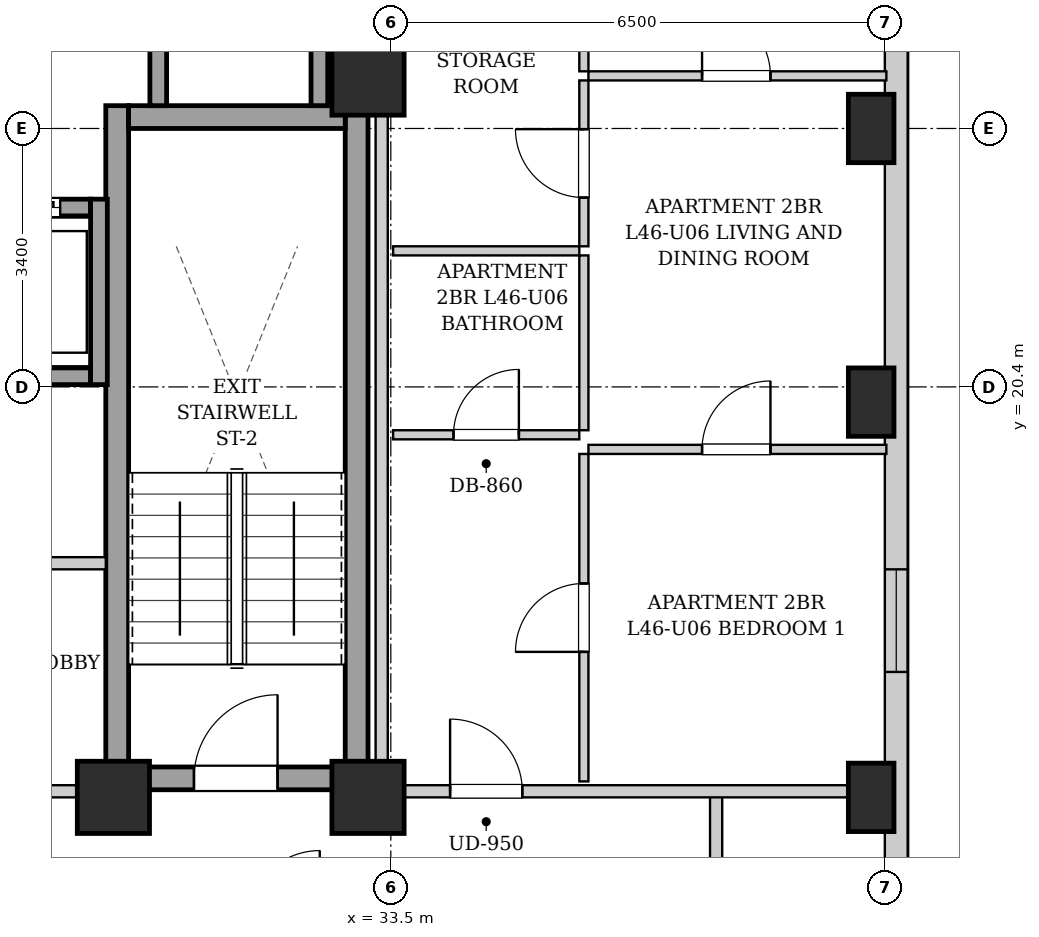
"""IFC4 building model, lengths in metres.
Left out: names, types, materials, properties, quantities, classifications, styles, units other than length and angle.
Written with IfcOpenShell. Run it as: python <this file> out.ifc"""

import sys

from ifc_helpers import new_model, si_unit, direction, frame, frame_2d, origin, origin_2d, place, context, subcontext, project, spatial, rectangle, extrude, element, fill, save


model = new_model("IFC4")
c1 = context("Model", 3, precision=1e-05, world=origin(), true_north=direction((0.0, 1.0)))
c2 = subcontext(c1, "Body", "Model", "MODEL_VIEW")
j1 = project(units=[si_unit("LENGTHUNIT", "METRE"), si_unit("PLANEANGLEUNIT", "RADIAN")], contexts=[c1])
p1 = place(None, origin())
s1 = spatial("IfcSite", under=j1, at=p1, CompositionType="ELEMENT")
p2 = place(p1, origin())
s2 = spatial("IfcBuilding", under=s1, at=p2, CompositionType="ELEMENT")
p3 = place(p2, frame((0.0, 0.0, 160.15)))
s3 = spatial("IfcBuildingStorey", under=s2, at=p3, CompositionType="ELEMENT", Elevation=160.15)
for number, where, z_axis, x_axis in (
    (1, (39.82, 15.0, 0.0), (0.0, 0.0, 1.0), (1.0, 0.0, 0.0)),
    (2, (39.82, 20.2, 0.0), (0.0, 0.0, 1.0), (1.0, 0.0, 0.0)),
    (3, (39.82, 23.8, 0.0), (0.0, 0.0, 1.0), (1.0, 0.0, 0.0)),
):
    element("IfcColumn", number, at=place(p3, frame(where, z_axis=z_axis, x_axis=x_axis)), inside=s3, PredefinedType="COLUMN", context=c2, shape_type="SweptSolid", body=[
        extrude(rectangle(XDim=0.6, YDim=0.9, at=origin_2d()), origin(), (0.0, 0.0, 1.0), 3.25),
    ])
for number, where, z_axis, x_axis in (
    (4, (29.85, 15.0, 0.0), (0.0, 0.0, 1.0), (1.0, 0.0, 0.0)),
    (5, (33.2, 15.0, 0.0), (0.0, 0.0, 1.0), (1.0, 0.0, 0.0)),
    (6, (33.2, 24.45, 0.0), (0.0, 0.0, 1.0), (1.0, 0.0, 0.0)),
):
    element("IfcColumn", number, at=place(p3, frame(where, z_axis=z_axis, x_axis=x_axis)), inside=s3, PredefinedType="COLUMN", context=c2, shape_type="SweptSolid", body=[
        extrude(rectangle(XDim=0.95, YDim=0.95, at=origin_2d()), origin(), (0.0, 0.0, 1.0), 3.25),
    ])
p4 = place(p3, frame((40.15, 40.8, 0.0), z_axis=(0.0, 0.0, 1.0), x_axis=(0.0, -1.0, 0.0)))
e7 = element("IfcWall", 7, at=p4, inside=s3, PredefinedType="SOLIDWALL", context=c2, shape_type="SweptSolid", body=[
    extrude(rectangle(XDim=34.5, YDim=0.3, at=frame_2d((17.25, 0.0))), origin(), (0.0, 0.0, 1.0), 2.99),
])
p5 = place(p4, frame((31.575, 0.0, 0.55)))
e8 = element("IfcOpeningElement", 8, at=p5, cuts=e7, PredefinedType="OPENING", context=c2, shape_type="SweptSolid", body=[
    extrude(rectangle(XDim=1.35, YDim=1.2, at=frame_2d((0.675, 0.6))), frame((0.0, 0.16, 0.0), z_axis=(0.0, -1.0, 0.0), x_axis=(1.0, 0.0, 0.0)), (0.0, 0.0, 1.0), 0.32),
])
p6 = place(p4, frame((3.075, 0.0, 0.55)))
e9 = element("IfcOpeningElement", 9, at=p6, cuts=e7, PredefinedType="OPENING", context=c2, shape_type="SweptSolid", body=[
    extrude(rectangle(XDim=1.35, YDim=1.2, at=frame_2d((0.675, 0.6))), frame((0.0, 0.16, 0.0), z_axis=(0.0, -1.0, 0.0), x_axis=(1.0, 0.0, 0.0)), (0.0, 0.0, 1.0), 0.32),
])
p7 = place(p4, frame((1.085, 0.0, 0.55)))
e10 = element("IfcOpeningElement", 10, at=p7, cuts=e7, PredefinedType="OPENING", context=c2, shape_type="SweptSolid", body=[
    extrude(rectangle(XDim=1.35, YDim=1.2, at=frame_2d((0.675, 0.6))), frame((0.0, 0.16, 0.0), z_axis=(0.0, -1.0, 0.0), x_axis=(1.0, 0.0, 0.0)), (0.0, 0.0, 1.0), 0.32),
])
p8 = place(p4, frame((22.8, 0.0, 0.55)))
e11 = element("IfcOpeningElement", 11, at=p8, cuts=e7, PredefinedType="OPENING", context=c2, shape_type="SweptSolid", body=[
    extrude(rectangle(XDim=1.35, YDim=1.2, at=frame_2d((0.675, 0.6))), frame((0.0, 0.16, 0.0), z_axis=(0.0, -1.0, 0.0), x_axis=(1.0, 0.0, 0.0)), (0.0, 0.0, 1.0), 0.32),
])
p9 = place(p4, frame((13.425, 0.0, 0.55)))
e12 = element("IfcOpeningElement", 12, at=p9, cuts=e7, PredefinedType="OPENING", context=c2, shape_type="SweptSolid", body=[
    extrude(rectangle(XDim=1.35, YDim=1.2, at=frame_2d((0.675, 0.6))), frame((0.0, 0.16, 0.0), z_axis=(0.0, -1.0, 0.0), x_axis=(1.0, 0.0, 0.0)), (0.0, 0.0, 1.0), 0.32),
])
for number, where, z_axis, x_axis in (
    (13, (29.9, 15.1, 0.0), (0.0, 0.0, 1.0), (0.0, 1.0, 0.0)),
    (14, (33.05, 15.1, 0.0), (0.0, 0.0, 1.0), (0.0, 1.0, 0.0)),
):
    element("IfcWall", number, at=place(p3, frame(where, z_axis=z_axis, x_axis=x_axis)), inside=s3, PredefinedType="SHEAR", context=c2, shape_type="SweptSolid", body=[
        extrude(rectangle(XDim=9.0, YDim=0.3, at=frame_2d((4.5, 0.0))), origin(), (0.0, 0.0, 1.0), 2.99),
    ])
p10 = place(p3, frame((30.05, 23.95, 0.0), z_axis=(0.0, 0.0, 1.0), x_axis=(1.0, 0.0, 0.0)))
e15 = element("IfcWall", 15, at=p10, inside=s3, PredefinedType="SHEAR", context=c2, shape_type="SweptSolid", body=[
    extrude(rectangle(XDim=2.85, YDim=0.3, at=frame_2d((1.425, 0.0))), origin(), (0.0, 0.0, 1.0), 2.99),
])
p11 = place(p3, frame((30.05, 15.25, 0.0), z_axis=(0.0, 0.0, 1.0), x_axis=(1.0, 0.0, 0.0)))
e16 = element("IfcWall", 16, at=p11, inside=s3, PredefinedType="SHEAR", context=c2, shape_type="SweptSolid", body=[
    extrude(rectangle(XDim=2.85, YDim=0.3, at=frame_2d((1.425, 0.0))), origin(), (0.0, 0.0, 1.0), 2.99),
])
p12 = place(p11, frame((0.86, 0.0, 0.0)))
e17 = element("IfcOpeningElement", 17, at=p12, cuts=e16, PredefinedType="OPENING", context=c2, shape_type="SweptSolid", body=[
    extrude(rectangle(XDim=1.1, YDim=2.05, at=frame_2d((0.55, 1.025))), frame((0.0, 0.16, 0.0), z_axis=(0.0, -1.0, 0.0), x_axis=(1.0, 0.0, 0.0)), (0.0, 0.0, 1.0), 0.32),
])
p13 = place(p3, frame((27.65, 20.54, 0.0), z_axis=(0.0, 0.0, 1.0), x_axis=(1.0, 0.0, 0.0)))
e18 = element("IfcWall", 18, at=p13, inside=s3, PredefinedType="SHEAR", context=c2, shape_type="SweptSolid", body=[
    extrude(rectangle(XDim=1.9, YDim=0.22, at=frame_2d((0.95, 0.0))), origin(), (0.0, 0.0, 1.0), 2.99),
])
p14 = place(p3, frame((27.65, 22.76, 0.0), z_axis=(0.0, 0.0, 1.0), x_axis=(1.0, 0.0, 0.0)))
e19 = element("IfcWall", 19, at=p14, inside=s3, PredefinedType="SHEAR", context=c2, shape_type="SweptSolid", body=[
    extrude(rectangle(XDim=1.9, YDim=0.22, at=frame_2d((0.95, 0.0))), origin(), (0.0, 0.0, 1.0), 2.99),
])
p15 = place(p14, frame((0.4, 0.0, 0.0)))
e20 = element("IfcOpeningElement", 20, at=p15, cuts=e19, PredefinedType="OPENING", context=c2, shape_type="SweptSolid", body=[
    extrude(rectangle(XDim=1.1, YDim=2.15, at=frame_2d((0.55, 1.075))), frame((0.0, 0.12, 0.0), z_axis=(0.0, -1.0, 0.0), x_axis=(1.0, 0.0, 0.0)), (0.0, 0.0, 1.0), 0.24),
])
p16 = place(p3, frame((29.66, 20.43, 0.0), z_axis=(0.0, 0.0, 1.0), x_axis=(0.0, 1.0, 0.0)))
e21 = element("IfcWall", 21, at=p16, inside=s3, PredefinedType="SHEAR", context=c2, shape_type="SweptSolid", body=[
    extrude(rectangle(XDim=2.44, YDim=0.22, at=frame_2d((1.22, 0.0))), origin(), (0.0, 0.0, 1.0), 2.99),
])
for number, where, z_axis, x_axis in (
    (22, (30.44, 24.1, 0.0), (0.0, 0.0, 1.0), (0.0, 1.0, 0.0)),
    (23, (32.56, 24.1, 0.0), (0.0, 0.0, 1.0), (0.0, 1.0, 0.0)),
):
    element("IfcWall", number, at=place(p3, frame(where, z_axis=z_axis, x_axis=x_axis)), inside=s3, PredefinedType="SHEAR", context=c2, shape_type="SweptSolid", body=[
        extrude(rectangle(XDim=2.07, YDim=0.22, at=frame_2d((1.035, 0.0))), origin(), (0.0, 0.0, 1.0), 2.99),
    ])
p17 = place(p3, frame((21.25, 15.08, 0.0), z_axis=(0.0, 0.0, 1.0), x_axis=(1.0, 0.0, 0.0)))
e24 = element("IfcWall", 24, at=p17, inside=s3, PredefinedType="PARTITIONING", context=c2, shape_type="SweptSolid", body=[
    extrude(rectangle(XDim=8.5, YDim=0.16, at=frame_2d((4.25, 0.0))), origin(), (0.0, 0.0, 1.0), 2.442),
])
p18 = place(p17, frame((3.725, 0.0, 0.0)))
e25 = element("IfcOpeningElement", 25, at=p18, cuts=e24, PredefinedType="OPENING", context=c2, shape_type="SweptSolid", body=[
    extrude(rectangle(XDim=1.05, YDim=2.05, at=frame_2d((0.525, 1.025))), frame((0.0, 0.09, 0.0), z_axis=(0.0, -1.0, 0.0), x_axis=(1.0, 0.0, 0.0)), (0.0, 0.0, 1.0), 0.18),
])
p19 = place(p3, frame((28.65, 18.08, 0.0), z_axis=(0.0, 0.0, 1.0), x_axis=(1.0, 0.0, 0.0)))
e26 = element("IfcWall", 26, at=p19, inside=s3, PredefinedType="PARTITIONING", context=c2, shape_type="SweptSolid", body=[
    extrude(rectangle(XDim=1.1, YDim=0.16, at=frame_2d((0.55, 0.0))), origin(), (0.0, 0.0, 1.0), 2.99),
])
p20 = place(p3, frame((33.12, 24.12, 0.0), z_axis=(0.0, 0.0, 1.0), x_axis=(0.0, 1.0, 0.0)))
e27 = element("IfcWall", 27, at=p20, inside=s3, PredefinedType="PARTITIONING", context=c2, shape_type="SweptSolid", body=[
    extrude(rectangle(XDim=4.76, YDim=0.16, at=frame_2d((2.38, 0.0))), origin(), (0.0, 0.0, 1.0), 2.99),
])
p21 = place(p3, frame((37.78, 13.35, 0.0), z_axis=(0.0, 0.0, 1.0), x_axis=(0.0, 1.0, 0.0)))
e28 = element("IfcWall", 28, at=p21, inside=s3, PredefinedType="PARTITIONING", context=c2, shape_type="SweptSolid", body=[
    extrude(rectangle(XDim=1.74, YDim=0.16, at=frame_2d((0.87, 0.0))), origin(), (0.0, 0.0, 1.0), 2.99),
])
p22 = place(p3, frame((33.38, 15.08, 0.0), z_axis=(0.0, 0.0, 1.0), x_axis=(1.0, 0.0, 0.0)))
e29 = element("IfcWall", 29, at=p22, inside=s3, PredefinedType="PARTITIONING", context=c2, shape_type="SweptSolid", body=[
    extrude(rectangle(XDim=6.64, YDim=0.16, at=frame_2d((3.32, 0.0))), origin(), (0.0, 0.0, 1.0), 2.442),
])
p23 = place(p22, frame((0.9, 0.0, 0.0)))
e30 = element("IfcOpeningElement", 30, at=p23, cuts=e29, PredefinedType="OPENING", context=c2, shape_type="SweptSolid", body=[
    extrude(rectangle(XDim=0.95, YDim=2.1, at=frame_2d((0.475, 1.05))), frame((0.0, 0.09, 0.0), z_axis=(0.0, -1.0, 0.0), x_axis=(1.0, 0.0, 0.0)), (0.0, 0.0, 1.0), 0.18),
])
p24 = place(p3, frame((33.53, 22.19, 0.0), z_axis=(0.0, 0.0, 1.0), x_axis=(1.0, 0.0, 0.0)))
e31 = element("IfcWall", 31, at=p24, inside=s3, PredefinedType="PARTITIONING", context=c2, shape_type="SweptSolid", body=[
    extrude(rectangle(XDim=2.45, YDim=0.12, at=frame_2d((1.225, 0.0))), origin(), (0.0, 0.0, 1.0), 2.99),
])
p25 = place(p3, frame((36.04, 22.25, 0.0), z_axis=(0.0, 0.0, 1.0), x_axis=(0.0, 1.0, 0.0)))
e32 = element("IfcWall", 32, at=p25, inside=s3, PredefinedType="PARTITIONING", context=c2, shape_type="SweptSolid", body=[
    extrude(rectangle(XDim=2.182, YDim=0.12, at=frame_2d((1.091, 0.0))), origin(), (0.0, 0.0, 1.0), 2.99),
])
p26 = place(p25, frame((0.641, 0.0, 0.0)))
e33 = element("IfcOpeningElement", 33, at=p26, cuts=e32, PredefinedType="OPENING", context=c2, shape_type="SweptSolid", body=[
    extrude(rectangle(XDim=0.9, YDim=2.05, at=frame_2d((0.45, 1.025))), frame((0.0, 0.07, 0.0), z_axis=(0.0, -1.0, 0.0), x_axis=(1.0, 0.0, 0.0)), (0.0, 0.0, 1.0), 0.14),
])
p27 = place(p3, frame((36.04, 24.552, 0.0), z_axis=(0.0, 0.0, 1.0), x_axis=(0.0, 1.0, 0.0)))
e34 = element("IfcWall", 34, at=p27, inside=s3, PredefinedType="PARTITIONING", context=c2, shape_type="SweptSolid", body=[
    extrude(rectangle(XDim=4.308, YDim=0.12, at=frame_2d((2.154, 0.0))), origin(), (0.0, 0.0, 1.0), 2.99),
])
p28 = place(p27, frame((1.704, 0.0, 0.0)))
e35 = element("IfcOpeningElement", 35, at=p28, cuts=e34, PredefinedType="OPENING", context=c2, shape_type="SweptSolid", body=[
    extrude(rectangle(XDim=0.9, YDim=2.05, at=frame_2d((0.45, 1.025))), frame((0.0, 0.07, 0.0), z_axis=(0.0, -1.0, 0.0), x_axis=(1.0, 0.0, 0.0)), (0.0, 0.0, 1.0), 0.14),
])
p29 = place(p3, frame((33.53, 19.77, 0.0), z_axis=(0.0, 0.0, 1.0), x_axis=(1.0, 0.0, 0.0)))
e36 = element("IfcWall", 36, at=p29, inside=s3, PredefinedType="PARTITIONING", context=c2, shape_type="SweptSolid", body=[
    extrude(rectangle(XDim=2.45, YDim=0.12, at=frame_2d((1.225, 0.0))), origin(), (0.0, 0.0, 1.0), 2.99),
])
p30 = place(p29, frame((0.795, 0.0, 0.0)))
e37 = element("IfcOpeningElement", 37, at=p30, cuts=e36, PredefinedType="OPENING", context=c2, shape_type="SweptSolid", body=[
    extrude(rectangle(XDim=0.86, YDim=2.05, at=frame_2d((0.43, 1.025))), frame((0.0, 0.07, 0.0), z_axis=(0.0, -1.0, 0.0), x_axis=(1.0, 0.0, 0.0)), (0.0, 0.0, 1.0), 0.14),
])
p31 = place(p3, frame((36.04, 19.83, 0.0), z_axis=(0.0, 0.0, 1.0), x_axis=(0.0, 1.0, 0.0)))
e38 = element("IfcWall", 38, at=p31, inside=s3, PredefinedType="PARTITIONING", context=c2, shape_type="SweptSolid", body=[
    extrude(rectangle(XDim=2.3, YDim=0.12, at=frame_2d((1.15, 0.0))), origin(), (0.0, 0.0, 1.0), 2.99),
])
p32 = place(p3, frame((36.04, 15.21, 0.0), z_axis=(0.0, 0.0, 1.0), x_axis=(0.0, 1.0, 0.0)))
e39 = element("IfcWall", 39, at=p32, inside=s3, PredefinedType="PARTITIONING", context=c2, shape_type="SweptSolid", body=[
    extrude(rectangle(XDim=4.308, YDim=0.12, at=frame_2d((2.154, 0.0))), origin(), (0.0, 0.0, 1.0), 2.99),
])
p33 = place(p32, frame((1.704, 0.0, 0.0)))
e40 = element("IfcOpeningElement", 40, at=p33, cuts=e39, PredefinedType="OPENING", context=c2, shape_type="SweptSolid", body=[
    extrude(rectangle(XDim=0.9, YDim=2.05, at=frame_2d((0.45, 1.025))), frame((0.0, 0.07, 0.0), z_axis=(0.0, -1.0, 0.0), x_axis=(1.0, 0.0, 0.0)), (0.0, 0.0, 1.0), 0.14),
])
p34 = place(p3, frame((36.1, 19.578, 0.0), z_axis=(0.0, 0.0, 1.0), x_axis=(1.0, 0.0, 0.0)))
e41 = element("IfcWall", 41, at=p34, inside=s3, PredefinedType="PARTITIONING", context=c2, shape_type="SweptSolid", body=[
    extrude(rectangle(XDim=3.92, YDim=0.12, at=frame_2d((1.96, 0.0))), origin(), (0.0, 0.0, 1.0), 2.99),
])
p35 = place(p34, frame((1.495, 0.0, 0.0)))
e42 = element("IfcOpeningElement", 42, at=p35, cuts=e41, PredefinedType="OPENING", context=c2, shape_type="SweptSolid", body=[
    extrude(rectangle(XDim=0.9, YDim=2.05, at=frame_2d((0.45, 1.025))), frame((0.0, 0.07, 0.0), z_axis=(0.0, -1.0, 0.0), x_axis=(1.0, 0.0, 0.0)), (0.0, 0.0, 1.0), 0.14),
])
p36 = place(p3, frame((36.1, 24.492, 0.0), z_axis=(0.0, 0.0, 1.0), x_axis=(1.0, 0.0, 0.0)))
e43 = element("IfcWall", 43, at=p36, inside=s3, PredefinedType="PARTITIONING", context=c2, shape_type="SweptSolid", body=[
    extrude(rectangle(XDim=3.92, YDim=0.12, at=frame_2d((1.96, 0.0))), origin(), (0.0, 0.0, 1.0), 2.621),
])
p37 = place(p36, frame((1.495, 0.0, 0.0)))
e44 = element("IfcOpeningElement", 44, at=p37, cuts=e43, PredefinedType="OPENING", context=c2, shape_type="SweptSolid", body=[
    extrude(rectangle(XDim=0.9, YDim=2.05, at=frame_2d((0.45, 1.025))), frame((0.0, 0.07, 0.0), z_axis=(0.0, -1.0, 0.0), x_axis=(1.0, 0.0, 0.0)), (0.0, 0.0, 1.0), 0.14),
])
p38 = place(p3, frame((33.38, 15.02, 0.0), z_axis=(0.0, 0.0, 1.0), x_axis=(0.0, 1.0, 0.0)))
e45 = element("IfcWall", 45, at=p38, inside=s3, PredefinedType="PARTITIONING", context=c2, shape_type="SweptSolid", body=[
    extrude(rectangle(XDim=13.98, YDim=0.16, at=frame_2d((6.99, 0.0))), origin(), (0.0, 0.0, 1.0), 2.99),
])
p39 = place(p12, origin())
e46 = element("IfcDoor", 46, at=p39, inside=s3, OperationType="SINGLE_SWING_RIGHT", PredefinedType="DOOR", context=c2, shape_type="SweptSolid", body=[
    extrude(rectangle(XDim=1.1, YDim=2.05, at=frame_2d((0.55, 1.025))), frame((0.0, 0.025, 0.0), z_axis=(0.0, -1.0, 0.0), x_axis=(1.0, 0.0, 0.0)), (0.0, 0.0, 1.0), 0.05),
])
fill(e17, e46)
p40 = place(p15, origin())
e47 = element("IfcDoor", 47, at=p40, inside=s3, OperationType="SLIDING_TO_LEFT", PredefinedType="DOOR", context=c2, shape_type="SweptSolid", body=[
    extrude(rectangle(XDim=1.1, YDim=2.15, at=frame_2d((0.55, 1.075))), frame((0.0, 0.025, 0.0), z_axis=(0.0, -1.0, 0.0), x_axis=(1.0, 0.0, 0.0)), (0.0, 0.0, 1.0), 0.05),
])
fill(e20, e47)
p41 = place(p23, origin())
e48 = element("IfcDoor", 48, at=p41, inside=s3, OperationType="SINGLE_SWING_LEFT", PredefinedType="DOOR", context=c2, shape_type="SweptSolid", body=[
    extrude(rectangle(XDim=0.95, YDim=2.1, at=frame_2d((0.475, 1.05))), frame((0.0, 0.025, 0.0), z_axis=(0.0, -1.0, 0.0), x_axis=(1.0, 0.0, 0.0)), (0.0, 0.0, 1.0), 0.05),
])
fill(e30, e48)
p42 = place(p26, origin())
e49 = element("IfcDoor", 49, at=p42, inside=s3, OperationType="SINGLE_SWING_RIGHT", PredefinedType="DOOR", context=c2, shape_type="SweptSolid", body=[
    extrude(rectangle(XDim=0.9, YDim=2.05, at=frame_2d((0.45, 1.025))), frame((0.0, 0.025, 0.0), z_axis=(0.0, -1.0, 0.0), x_axis=(1.0, 0.0, 0.0)), (0.0, 0.0, 1.0), 0.05),
])
fill(e33, e49)
p43 = place(p30, origin())
e50 = element("IfcDoor", 50, at=p43, inside=s3, OperationType="SINGLE_SWING_RIGHT", PredefinedType="DOOR", context=c2, shape_type="SweptSolid", body=[
    extrude(rectangle(XDim=0.86, YDim=2.05, at=frame_2d((0.43, 1.025))), frame((0.0, 0.025, 0.0), z_axis=(0.0, -1.0, 0.0), x_axis=(1.0, 0.0, 0.0)), (0.0, 0.0, 1.0), 0.05),
])
fill(e37, e50)
p44 = place(p33, origin())
e51 = element("IfcDoor", 51, at=p44, inside=s3, OperationType="SINGLE_SWING_LEFT", PredefinedType="DOOR", context=c2, shape_type="SweptSolid", body=[
    extrude(rectangle(XDim=0.9, YDim=2.05, at=frame_2d((0.45, 1.025))), frame((0.0, 0.025, 0.0), z_axis=(0.0, -1.0, 0.0), x_axis=(1.0, 0.0, 0.0)), (0.0, 0.0, 1.0), 0.05),
])
fill(e40, e51)
p45 = place(p35, origin())
e52 = element("IfcDoor", 52, at=p45, inside=s3, OperationType="SINGLE_SWING_RIGHT", PredefinedType="DOOR", context=c2, shape_type="SweptSolid", body=[
    extrude(rectangle(XDim=0.9, YDim=2.05, at=frame_2d((0.45, 1.025))), frame((0.0, 0.025, 0.0), z_axis=(0.0, -1.0, 0.0), x_axis=(1.0, 0.0, 0.0)), (0.0, 0.0, 1.0), 0.05),
])
fill(e42, e52)
p46 = place(p37, origin())
e53 = element("IfcDoor", 53, at=p46, inside=s3, OperationType="SINGLE_SWING_LEFT", PredefinedType="DOOR", context=c2, shape_type="SweptSolid", body=[
    extrude(rectangle(XDim=0.9, YDim=2.05, at=frame_2d((0.45, 1.025))), frame((0.0, 0.025, 0.0), z_axis=(0.0, -1.0, 0.0), x_axis=(1.0, 0.0, 0.0)), (0.0, 0.0, 1.0), 0.05),
])
fill(e44, e53)
p47 = place(p8, origin())
e54 = element("IfcWindow", 54, at=p47, inside=s3, PartitioningType="SINGLE_PANEL", PredefinedType="WINDOW", context=c2, shape_type="SweptSolid", body=[
    extrude(rectangle(XDim=1.35, YDim=1.2, at=frame_2d((0.675, 0.6))), frame((0.0, 0.03, 0.0), z_axis=(0.0, -1.0, 0.0), x_axis=(1.0, 0.0, 0.0)), (0.0, 0.0, 1.0), 0.06),
])
fill(e11, e54)
save(model, sys.argv[1])
